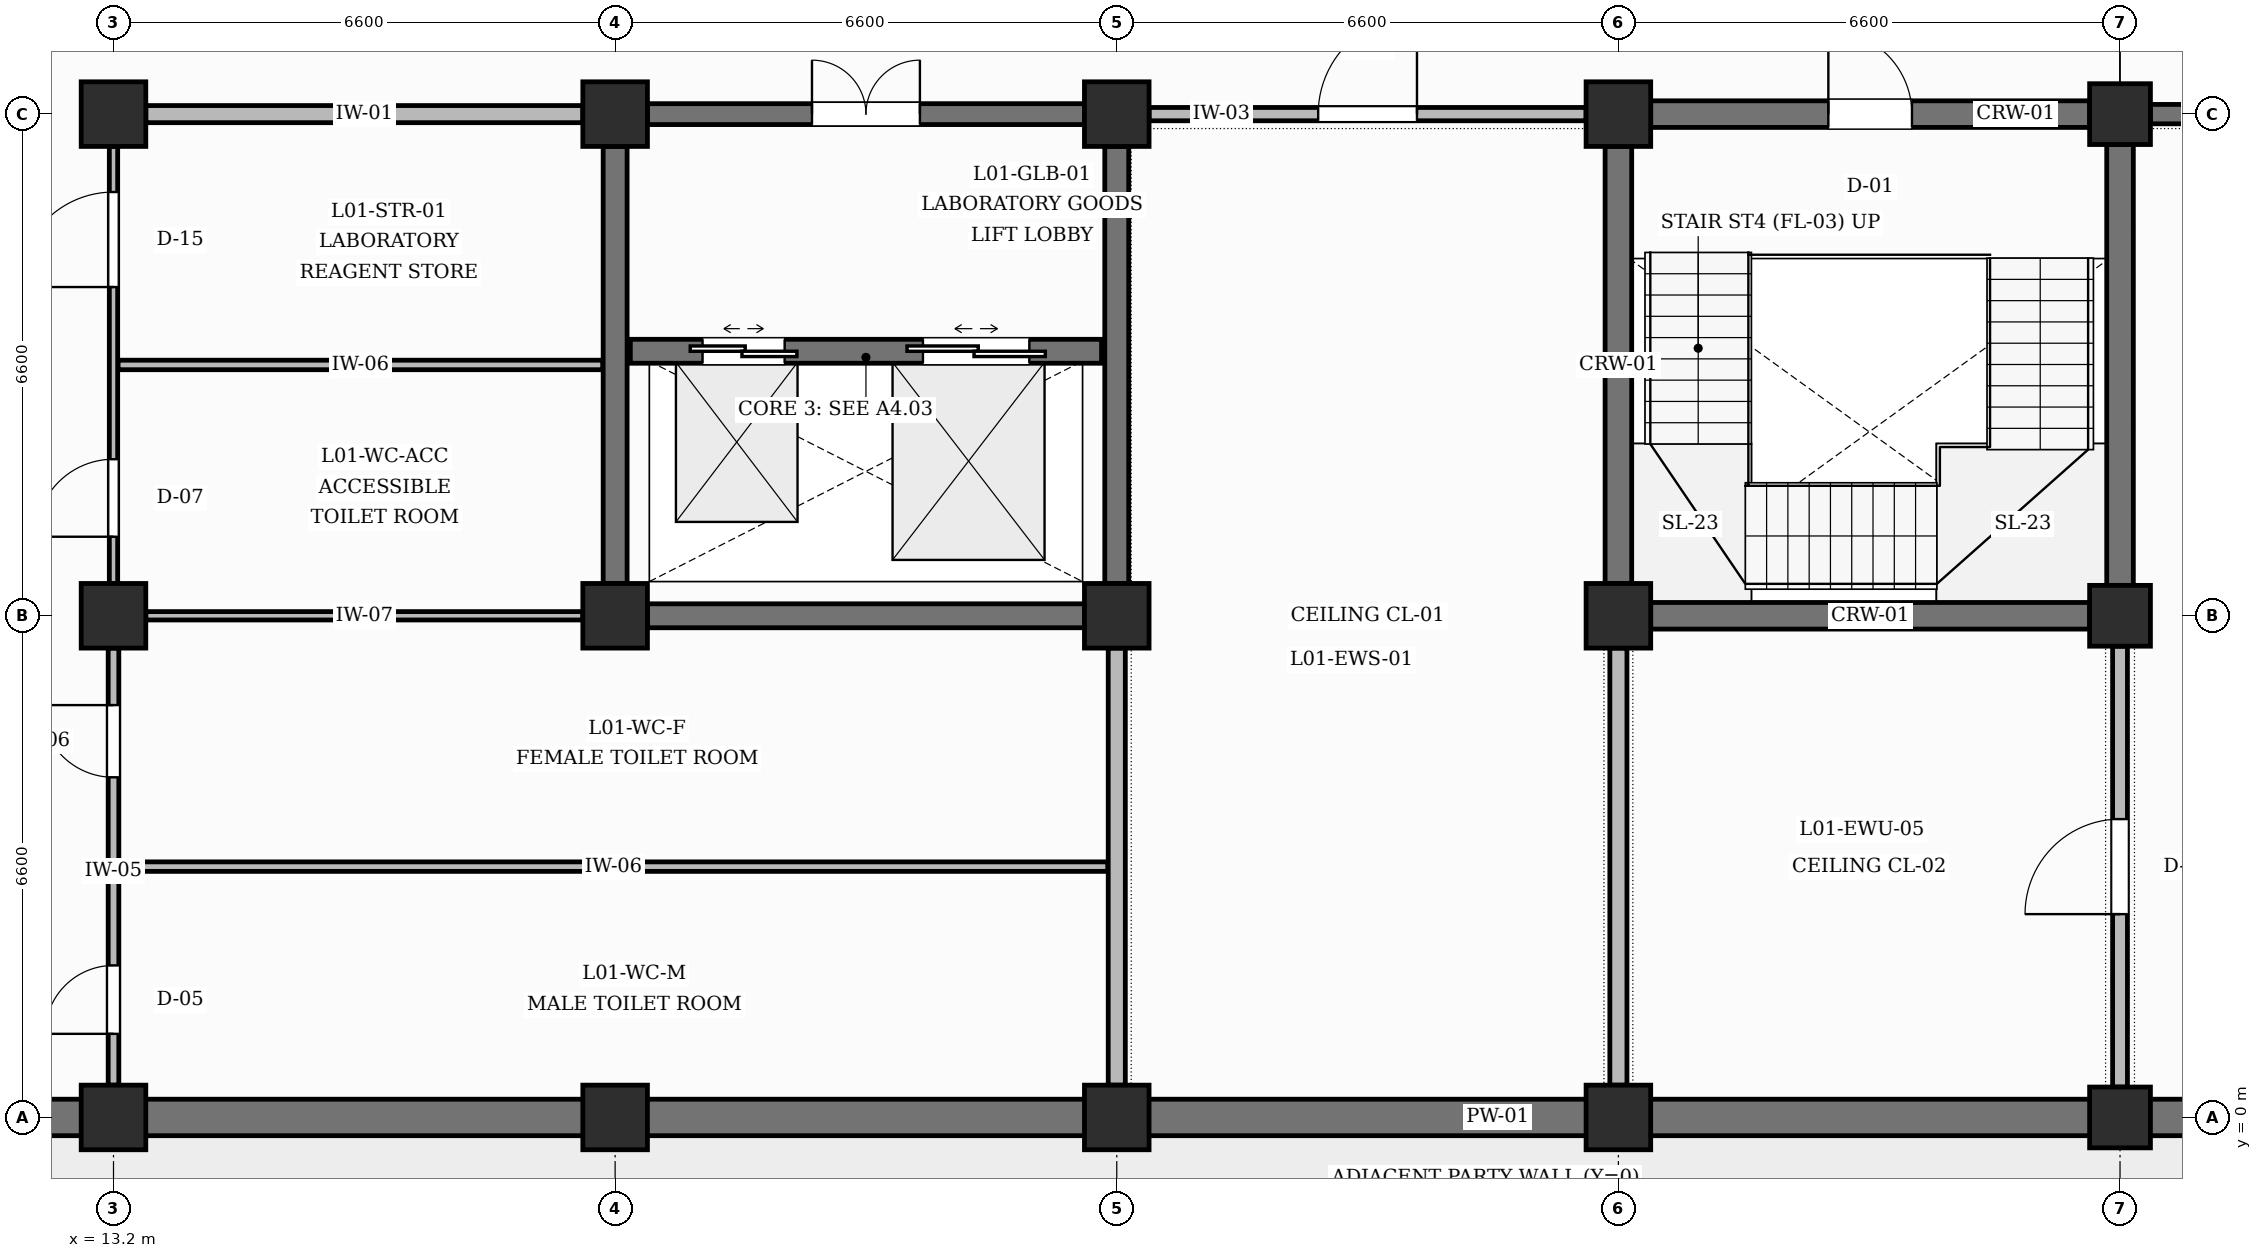
"""IFC4 building model, lengths in metres.
Left out: names, types, materials, properties, quantities, classifications, styles, units other than length and angle.
Written with IfcOpenShell. Run it as: python <this file> out.ifc"""

import sys

from ifc_helpers import new_model, si_unit, direction, frame, frame_2d, origin, origin_2d, place, context, subcontext, project, spatial, rectangle, extrude, element, fill, save


model = new_model("IFC4")
c1 = context("Model", 3, precision=1e-05, world=origin(), true_north=direction((0.0, 1.0)))
c2 = subcontext(c1, "Body", "Model", "MODEL_VIEW")
j1 = project(units=[si_unit("LENGTHUNIT", "METRE"), si_unit("PLANEANGLEUNIT", "RADIAN")], contexts=[c1])
p1 = place(None, origin())
s1 = spatial("IfcSite", under=j1, at=p1, CompositionType="ELEMENT")
p2 = place(p1, origin())
s2 = spatial("IfcBuilding", under=s1, at=p2, CompositionType="ELEMENT")
p3 = place(p2, frame((0.0, 0.0, 5.4)))
s3 = spatial("IfcBuildingStorey", under=s2, at=p3, CompositionType="ELEMENT", Elevation=5.4)
for number, where, z_axis, x_axis in (
    (1, (13.2, 0.0, 0.0), (0.0, 0.0, 1.0), (1.0, 0.0, 0.0)),
    (2, (13.2, 6.6, 0.0), (0.0, 0.0, 1.0), (1.0, 0.0, 0.0)),
    (3, (13.2, 13.2, 0.0), (0.0, 0.0, 1.0), (1.0, 0.0, 0.0)),
    (4, (19.8, 0.0, 0.0), (0.0, 0.0, 1.0), (1.0, 0.0, 0.0)),
    (5, (19.8, 6.6, 0.0), (0.0, 0.0, 1.0), (1.0, 0.0, 0.0)),
    (6, (19.8, 13.2, 0.0), (0.0, 0.0, 1.0), (1.0, 0.0, 0.0)),
    (7, (26.4, 0.0, 0.0), (0.0, 0.0, 1.0), (1.0, 0.0, 0.0)),
    (8, (26.4, 6.6, 0.0), (0.0, 0.0, 1.0), (1.0, 0.0, 0.0)),
    (9, (26.4, 13.2, 0.0), (0.0, 0.0, 1.0), (1.0, 0.0, 0.0)),
    (10, (33.0, 0.0, 0.0), (0.0, 0.0, 1.0), (1.0, 0.0, 0.0)),
    (11, (33.0, 6.6, 0.0), (0.0, 0.0, 1.0), (1.0, 0.0, 0.0)),
    (12, (33.0, 13.2, 0.0), (0.0, 0.0, 1.0), (1.0, 0.0, 0.0)),
):
    element("IfcColumn", number, at=place(p3, frame(where, z_axis=z_axis, x_axis=x_axis)), inside=s3, PredefinedType="COLUMN", context=c2, shape_type="SweptSolid", body=[
        extrude(rectangle(XDim=0.85, YDim=0.85, at=origin_2d()), origin(), (0.0, 0.0, 1.0), 4.8),
    ])
for number, where, z_axis, x_axis in (
    (13, (39.6, 0.0, 0.0), (0.0, 0.0, 1.0), (1.0, 0.0, 0.0)),
    (14, (39.6, 6.6, 0.0), (0.0, 0.0, 1.0), (1.0, 0.0, 0.0)),
    (15, (39.6, 13.2, 0.0), (0.0, 0.0, 1.0), (1.0, 0.0, 0.0)),
):
    element("IfcColumn", number, at=place(p3, frame(where, z_axis=z_axis, x_axis=x_axis)), inside=s3, PredefinedType="COLUMN", context=c2, shape_type="SweptSolid", body=[
        extrude(rectangle(XDim=0.8, YDim=0.8, at=origin_2d()), origin(), (0.0, 0.0, 1.0), 4.8),
    ])
for number, where, z_axis, x_axis in (
    (16, (7.025, 0.0, 0.0), (0.0, 0.0, 1.0), (1.0, 0.0, 0.0)),
    (17, (13.625, 0.0, 0.0), (0.0, 0.0, 1.0), (1.0, 0.0, 0.0)),
    (18, (20.225, 0.0, 0.0), (0.0, 0.0, 1.0), (1.0, 0.0, 0.0)),
    (19, (26.825, 0.0, 0.0), (0.0, 0.0, 1.0), (1.0, 0.0, 0.0)),
):
    element("IfcWall", number, at=place(p3, frame(where, z_axis=z_axis, x_axis=x_axis)), inside=s3, PredefinedType="SOLIDWALL", context=c2, shape_type="SweptSolid", body=[
        extrude(rectangle(XDim=5.75, YDim=0.48, at=frame_2d((2.875, 0.0))), origin(), (0.0, 0.0, 1.0), 3.85),
    ])
p4 = place(p3, frame((33.425, 0.0, 0.0), z_axis=(0.0, 0.0, 1.0), x_axis=(1.0, 0.0, 0.0)))
e20 = element("IfcWall", 20, at=p4, inside=s3, PredefinedType="SOLIDWALL", context=c2, shape_type="SweptSolid", body=[
    extrude(rectangle(XDim=5.775, YDim=0.48, at=frame_2d((2.887, 0.0))), origin(), (0.0, 0.0, 1.0), 3.85),
])
p5 = place(p3, frame((40.0, 0.0, 0.0), z_axis=(0.0, 0.0, 1.0), x_axis=(1.0, 0.0, 0.0)))
e21 = element("IfcWall", 21, at=p5, inside=s3, PredefinedType="SOLIDWALL", context=c2, shape_type="SweptSolid", body=[
    extrude(rectangle(XDim=5.8, YDim=0.48, at=frame_2d((2.9, 0.0))), origin(), (0.0, 0.0, 1.0), 3.85),
])
p6 = place(p3, frame((33.425, 6.6, 0.0), z_axis=(0.0, 0.0, 1.0), x_axis=(1.0, 0.0, 0.0)))
e22 = element("IfcWall", 22, at=p6, inside=s3, PredefinedType="SHEAR", context=c2, shape_type="SweptSolid", body=[
    extrude(rectangle(XDim=5.775, YDim=0.35, at=frame_2d((2.887, 0.0))), origin(), (0.0, 0.0, 1.0), 3.6),
])
p7 = place(p3, frame((33.425, 13.2, 0.0), z_axis=(0.0, 0.0, 1.0), x_axis=(1.0, 0.0, 0.0)))
e23 = element("IfcWall", 23, at=p7, inside=s3, PredefinedType="SHEAR", context=c2, shape_type="SweptSolid", body=[
    extrude(rectangle(XDim=5.775, YDim=0.35, at=frame_2d((2.887, 0.0))), origin(), (0.0, 0.0, 1.0), 3.7),
])
p8 = place(p7, frame((2.337, 0.0, 0.0)))
e24 = element("IfcOpeningElement", 24, at=p8, cuts=e23, PredefinedType="OPENING", context=c2, shape_type="SweptSolid", body=[
    extrude(rectangle(XDim=1.1, YDim=2.15, at=frame_2d((0.55, 1.075))), frame((0.0, 0.185, 0.0), z_axis=(0.0, -1.0, 0.0), x_axis=(1.0, 0.0, 0.0)), (0.0, 0.0, 1.0), 0.37),
])
p9 = place(p3, frame((33.0, 7.025, 0.0), z_axis=(0.0, 0.0, 1.0), x_axis=(0.0, 1.0, 0.0)))
e25 = element("IfcWall", 25, at=p9, inside=s3, PredefinedType="SHEAR", context=c2, shape_type="SweptSolid", body=[
    extrude(rectangle(XDim=5.75, YDim=0.35, at=frame_2d((2.875, 0.0))), origin(), (0.0, 0.0, 1.0), 3.7),
])
p10 = place(p3, frame((39.6, 7.0, 0.0), z_axis=(0.0, 0.0, 1.0), x_axis=(0.0, 1.0, 0.0)))
e26 = element("IfcWall", 26, at=p10, inside=s3, PredefinedType="SHEAR", context=c2, shape_type="SweptSolid", body=[
    extrude(rectangle(XDim=5.8, YDim=0.35, at=frame_2d((2.9, 0.0))), origin(), (0.0, 0.0, 1.0), 3.7),
])
p11 = place(p3, frame((20.225, 6.6, 0.0), z_axis=(0.0, 0.0, 1.0), x_axis=(1.0, 0.0, 0.0)))
e27 = element("IfcWall", 27, at=p11, inside=s3, PredefinedType="SHEAR", context=c2, shape_type="SweptSolid", body=[
    extrude(rectangle(XDim=5.75, YDim=0.315, at=frame_2d((2.875, 0.0))), origin(), (0.0, 0.0, 1.0), 3.6),
])
for number, where, z_axis, x_axis in (
    (28, (19.8, 7.025, 0.0), (0.0, 0.0, 1.0), (0.0, 1.0, 0.0)),
    (29, (26.4, 7.025, 0.0), (0.0, 0.0, 1.0), (0.0, 1.0, 0.0)),
):
    element("IfcWall", number, at=place(p3, frame(where, z_axis=z_axis, x_axis=x_axis)), inside=s3, PredefinedType="SHEAR", context=c2, shape_type="SweptSolid", body=[
        extrude(rectangle(XDim=5.75, YDim=0.315, at=frame_2d((2.875, 0.0))), origin(), (0.0, 0.0, 1.0), 3.7),
    ])
p12 = place(p3, frame((20.225, 13.2, 0.0), z_axis=(0.0, 0.0, 1.0), x_axis=(1.0, 0.0, 0.0)))
e30 = element("IfcWall", 30, at=p12, inside=s3, PredefinedType="SHEAR", context=c2, shape_type="SweptSolid", body=[
    extrude(rectangle(XDim=5.75, YDim=0.275, at=frame_2d((2.875, 0.0))), origin(), (0.0, 0.0, 1.0), 3.7),
])
p13 = place(p12, frame((2.165, 0.0, 0.0)))
e31 = element("IfcOpeningElement", 31, at=p13, cuts=e30, PredefinedType="OPENING", context=c2, shape_type="SweptSolid", body=[
    extrude(rectangle(XDim=1.42, YDim=2.2, at=frame_2d((0.71, 1.1))), frame((0.0, 0.147, 0.0), z_axis=(0.0, -1.0, 0.0), x_axis=(1.0, 0.0, 0.0)), (0.0, 0.0, 1.0), 0.295),
])
p14 = place(p3, frame((20.0, 10.08, 0.0), z_axis=(0.0, 0.0, 1.0), x_axis=(1.0, 0.0, 0.0)))
e32 = element("IfcWall", 32, at=p14, inside=s3, PredefinedType="SHEAR", context=c2, shape_type="SweptSolid", body=[
    extrude(rectangle(XDim=6.2, YDim=0.315, at=frame_2d((3.1, 0.0))), origin(), (0.0, 0.0, 1.0), 4.45),
])
p15 = place(p14, frame((0.95, 0.0, 0.0)))
e33 = element("IfcOpeningElement", 33, at=p15, cuts=e32, PredefinedType="OPENING", context=c2, shape_type="SweptSolid", body=[
    extrude(rectangle(XDim=1.08, YDim=2.15, at=frame_2d((0.54, 1.075))), frame((0.0, 0.167, 0.0), z_axis=(0.0, -1.0, 0.0), x_axis=(1.0, 0.0, 0.0)), (0.0, 0.0, 1.0), 0.335),
])
p16 = place(p14, frame((3.85, 0.0, 0.0)))
e34 = element("IfcOpeningElement", 34, at=p16, cuts=e32, PredefinedType="OPENING", context=c2, shape_type="SweptSolid", body=[
    extrude(rectangle(XDim=1.4, YDim=2.35, at=frame_2d((0.7, 1.175))), frame((0.0, 0.167, 0.0), z_axis=(0.0, -1.0, 0.0), x_axis=(1.0, 0.0, 0.0)), (0.0, 0.0, 1.0), 0.335),
])
p17 = place(p3, frame((13.2, 0.425, 0.0), z_axis=(0.0, 0.0, 1.0), x_axis=(0.0, 1.0, 0.0)))
e35 = element("IfcWall", 35, at=p17, inside=s3, PredefinedType="PARTITIONING", context=c2, shape_type="SweptSolid", body=[
    extrude(rectangle(XDim=5.75, YDim=0.14, at=frame_2d((2.875, 0.0))), origin(), (0.0, 0.0, 1.0), 3.7),
])
p18 = place(p17, frame((0.675, 0.0, 0.0)))
e36 = element("IfcOpeningElement", 36, at=p18, cuts=e35, PredefinedType="OPENING", context=c2, shape_type="SweptSolid", body=[
    extrude(rectangle(XDim=0.9, YDim=2.1, at=frame_2d((0.45, 1.05))), frame((0.0, 0.08, 0.0), z_axis=(0.0, -1.0, 0.0), x_axis=(1.0, 0.0, 0.0)), (0.0, 0.0, 1.0), 0.16),
])
p19 = place(p17, frame((4.05, 0.0, 0.0)))
e37 = element("IfcOpeningElement", 37, at=p19, cuts=e35, PredefinedType="OPENING", context=c2, shape_type="SweptSolid", body=[
    extrude(rectangle(XDim=0.95, YDim=2.1, at=frame_2d((0.475, 1.05))), frame((0.0, 0.08, 0.0), z_axis=(0.0, -1.0, 0.0), x_axis=(1.0, 0.0, 0.0)), (0.0, 0.0, 1.0), 0.16),
])
p20 = place(p3, frame((26.4, 0.425, 0.0), z_axis=(0.0, 0.0, 1.0), x_axis=(0.0, 1.0, 0.0)))
e38 = element("IfcWall", 38, at=p20, inside=s3, PredefinedType="PARTITIONING", context=c2, shape_type="SweptSolid", body=[
    extrude(rectangle(XDim=5.75, YDim=0.225, at=frame_2d((2.875, 0.0))), origin(), (0.0, 0.0, 1.0), 3.7),
])
p21 = place(p3, frame((13.625, 6.6, 0.0), z_axis=(0.0, 0.0, 1.0), x_axis=(1.0, 0.0, 0.0)))
e39 = element("IfcWall", 39, at=p21, inside=s3, PredefinedType="PARTITIONING", context=c2, shape_type="SweptSolid", body=[
    extrude(rectangle(XDim=5.75, YDim=0.11, at=frame_2d((2.875, 0.0))), origin(), (0.0, 0.0, 1.0), 3.7),
])
p22 = place(p3, frame((13.2, 7.025, 0.0), z_axis=(0.0, 0.0, 1.0), x_axis=(0.0, 1.0, 0.0)))
e40 = element("IfcWall", 40, at=p22, inside=s3, PredefinedType="PARTITIONING", context=c2, shape_type="SweptSolid", body=[
    extrude(rectangle(XDim=5.75, YDim=0.11, at=frame_2d((2.875, 0.0))), origin(), (0.0, 0.0, 1.0), 3.7),
])
p23 = place(p22, frame((0.615, 0.0, 0.0)))
e41 = element("IfcOpeningElement", 41, at=p23, cuts=e40, PredefinedType="OPENING", context=c2, shape_type="SweptSolid", body=[
    extrude(rectangle(XDim=1.02, YDim=2.15, at=frame_2d((0.51, 1.075))), frame((0.0, 0.065, 0.0), z_axis=(0.0, -1.0, 0.0), x_axis=(1.0, 0.0, 0.0)), (0.0, 0.0, 1.0), 0.13),
])
p24 = place(p22, frame((3.9, 0.0, 0.0)))
e42 = element("IfcOpeningElement", 42, at=p24, cuts=e40, PredefinedType="OPENING", context=c2, shape_type="SweptSolid", body=[
    extrude(rectangle(XDim=1.25, YDim=2.25, at=frame_2d((0.625, 1.125))), frame((0.0, 0.065, 0.0), z_axis=(0.0, -1.0, 0.0), x_axis=(1.0, 0.0, 0.0)), (0.0, 0.0, 1.0), 0.13),
])
p25 = place(p3, frame((13.625, 13.2, 0.0), z_axis=(0.0, 0.0, 1.0), x_axis=(1.0, 0.0, 0.0)))
e43 = element("IfcWall", 43, at=p25, inside=s3, PredefinedType="PARTITIONING", context=c2, shape_type="SweptSolid", body=[
    extrude(rectangle(XDim=5.75, YDim=0.225, at=frame_2d((2.875, 0.0))), origin(), (0.0, 0.0, 1.0), 3.6),
])
p26 = place(p3, frame((33.0, 0.425, 0.0), z_axis=(0.0, 0.0, 1.0), x_axis=(0.0, 1.0, 0.0)))
e44 = element("IfcWall", 44, at=p26, inside=s3, PredefinedType="PARTITIONING", context=c2, shape_type="SweptSolid", body=[
    extrude(rectangle(XDim=5.75, YDim=0.225, at=frame_2d((2.875, 0.0))), origin(), (0.0, 0.0, 1.0), 3.7),
])
p27 = place(p3, frame((26.825, 13.2, 0.0), z_axis=(0.0, 0.0, 1.0), x_axis=(1.0, 0.0, 0.0)))
e45 = element("IfcWall", 45, at=p27, inside=s3, PredefinedType="PARTITIONING", context=c2, shape_type="SweptSolid", body=[
    extrude(rectangle(XDim=5.75, YDim=0.175, at=frame_2d((2.875, 0.0))), origin(), (0.0, 0.0, 1.0), 3.6),
])
p28 = place(p27, frame((2.225, 0.0, 0.0)))
e46 = element("IfcOpeningElement", 46, at=p28, cuts=e45, PredefinedType="OPENING", context=c2, shape_type="SweptSolid", body=[
    extrude(rectangle(XDim=1.3, YDim=2.3, at=frame_2d((0.65, 1.15))), frame((0.0, 0.097, 0.0), z_axis=(0.0, -1.0, 0.0), x_axis=(1.0, 0.0, 0.0)), (0.0, 0.0, 1.0), 0.195),
])
p29 = place(p3, frame((39.6, 0.4, 0.0), z_axis=(0.0, 0.0, 1.0), x_axis=(0.0, 1.0, 0.0)))
e47 = element("IfcWall", 47, at=p29, inside=s3, PredefinedType="PARTITIONING", context=c2, shape_type="SweptSolid", body=[
    extrude(rectangle(XDim=5.8, YDim=0.195, at=frame_2d((2.9, 0.0))), origin(), (0.0, 0.0, 1.0), 3.7),
])
p30 = place(p29, frame((2.275, 0.0, 0.0)))
e48 = element("IfcOpeningElement", 48, at=p30, cuts=e47, PredefinedType="OPENING", context=c2, shape_type="SweptSolid", body=[
    extrude(rectangle(XDim=1.25, YDim=2.25, at=frame_2d((0.625, 1.125))), frame((0.0, 0.107, 0.0), z_axis=(0.0, -1.0, 0.0), x_axis=(1.0, 0.0, 0.0)), (0.0, 0.0, 1.0), 0.215),
])
p31 = place(p3, frame((40.0, 13.2, 0.0), z_axis=(0.0, 0.0, 1.0), x_axis=(1.0, 0.0, 0.0)))
e49 = element("IfcWall", 49, at=p31, inside=s3, PredefinedType="SHEAR", context=c2, shape_type="SweptSolid", body=[
    extrude(rectangle(XDim=5.8, YDim=0.255, at=frame_2d((2.9, 0.0))), origin(), (0.0, 0.0, 1.0), 3.6),
])
p32 = place(p31, frame((2.275, 0.0, 0.0)))
e50 = element("IfcOpeningElement", 50, at=p32, cuts=e49, PredefinedType="OPENING", context=c2, shape_type="SweptSolid", body=[
    extrude(rectangle(XDim=1.25, YDim=2.25, at=frame_2d((0.625, 1.125))), frame((0.0, 0.137, 0.0), z_axis=(0.0, -1.0, 0.0), x_axis=(1.0, 0.0, 0.0)), (0.0, 0.0, 1.0), 0.275),
])
p33 = place(p3, frame((13.275, 3.3, 0.0), z_axis=(0.0, 0.0, 1.0), x_axis=(1.0, 0.0, 0.0)))
e51 = element("IfcWall", 51, at=p33, inside=s3, PredefinedType="PARTITIONING", context=c2, shape_type="SweptSolid", body=[
    extrude(rectangle(XDim=13.008, YDim=0.125, at=frame_2d((6.504, 0.0))), origin(), (0.0, 0.0, 1.0), 4.45),
])
p34 = place(p3, frame((13.26, 9.9, 0.0), z_axis=(0.0, 0.0, 1.0), x_axis=(1.0, 0.0, 0.0)))
e52 = element("IfcWall", 52, at=p34, inside=s3, PredefinedType="PARTITIONING", context=c2, shape_type="SweptSolid", body=[
    extrude(rectangle(XDim=6.377, YDim=0.125, at=frame_2d((3.189, 0.0))), origin(), (0.0, 0.0, 1.0), 4.45),
])
p35 = place(p8, origin())
e53 = element("IfcDoor", 53, at=p35, inside=s3, OperationType="SINGLE_SWING_LEFT", PredefinedType="DOOR", context=c2, shape_type="SweptSolid", body=[
    extrude(rectangle(XDim=1.1, YDim=2.15, at=frame_2d((0.55, 1.075))), frame((0.0, 0.025, 0.0), z_axis=(0.0, -1.0, 0.0), x_axis=(1.0, 0.0, 0.0)), (0.0, 0.0, 1.0), 0.05),
])
fill(e24, e53)
p36 = place(p15, origin())
e54 = element("IfcDoor", 54, at=p36, inside=s3, OperationType="DOUBLE_DOOR_SLIDING", PredefinedType="USERDEFINED", context=c2, shape_type="SweptSolid", body=[
    extrude(rectangle(XDim=1.08, YDim=2.15, at=frame_2d((0.54, 1.075))), frame((0.0, 0.025, 0.0), z_axis=(0.0, -1.0, 0.0), x_axis=(1.0, 0.0, 0.0)), (0.0, 0.0, 1.0), 0.05),
])
fill(e33, e54)
p37 = place(p16, origin())
e55 = element("IfcDoor", 55, at=p37, inside=s3, OperationType="DOUBLE_DOOR_SLIDING", PredefinedType="USERDEFINED", context=c2, shape_type="SweptSolid", body=[
    extrude(rectangle(XDim=1.4, YDim=2.35, at=frame_2d((0.7, 1.175))), frame((0.0, 0.025, 0.0), z_axis=(0.0, -1.0, 0.0), x_axis=(1.0, 0.0, 0.0)), (0.0, 0.0, 1.0), 0.05),
])
fill(e34, e55)
p38 = place(p13, origin())
e56 = element("IfcDoor", 56, at=p38, inside=s3, OperationType="DOUBLE_DOOR_SINGLE_SWING", PredefinedType="DOOR", context=c2, shape_type="SweptSolid", body=[
    extrude(rectangle(XDim=1.42, YDim=2.2, at=frame_2d((0.71, 1.1))), frame((0.0, 0.025, 0.0), z_axis=(0.0, -1.0, 0.0), x_axis=(1.0, 0.0, 0.0)), (0.0, 0.0, 1.0), 0.05),
])
fill(e31, e56)
p39 = place(p18, origin())
e57 = element("IfcDoor", 57, at=p39, inside=s3, OperationType="SINGLE_SWING_LEFT", PredefinedType="DOOR", context=c2, shape_type="SweptSolid", body=[
    extrude(rectangle(XDim=0.9, YDim=2.1, at=frame_2d((0.45, 1.05))), frame((0.0, 0.025, 0.0), z_axis=(0.0, -1.0, 0.0), x_axis=(1.0, 0.0, 0.0)), (0.0, 0.0, 1.0), 0.05),
])
fill(e36, e57)
p40 = place(p19, origin())
e58 = element("IfcDoor", 58, at=p40, inside=s3, OperationType="SINGLE_SWING_RIGHT", PredefinedType="DOOR", context=c2, shape_type="SweptSolid", body=[
    extrude(rectangle(XDim=0.95, YDim=2.1, at=frame_2d((0.475, 1.05))), frame((0.0, 0.025, 0.0), z_axis=(0.0, -1.0, 0.0), x_axis=(1.0, 0.0, 0.0)), (0.0, 0.0, 1.0), 0.05),
])
fill(e37, e58)
p41 = place(p23, origin())
e59 = element("IfcDoor", 59, at=p41, inside=s3, OperationType="SINGLE_SWING_LEFT", PredefinedType="DOOR", context=c2, shape_type="SweptSolid", body=[
    extrude(rectangle(XDim=1.02, YDim=2.15, at=frame_2d((0.51, 1.075))), frame((0.0, 0.025, 0.0), z_axis=(0.0, -1.0, 0.0), x_axis=(1.0, 0.0, 0.0)), (0.0, 0.0, 1.0), 0.05),
])
fill(e41, e59)
p42 = place(p24, origin())
e60 = element("IfcDoor", 60, at=p42, inside=s3, OperationType="SINGLE_SWING_LEFT", PredefinedType="DOOR", context=c2, shape_type="SweptSolid", body=[
    extrude(rectangle(XDim=1.25, YDim=2.25, at=frame_2d((0.625, 1.125))), frame((0.0, 0.025, 0.0), z_axis=(0.0, -1.0, 0.0), x_axis=(1.0, 0.0, 0.0)), (0.0, 0.0, 1.0), 0.05),
])
fill(e42, e60)
p43 = place(p28, origin())
e61 = element("IfcDoor", 61, at=p43, inside=s3, OperationType="SINGLE_SWING_RIGHT", PredefinedType="DOOR", context=c2, shape_type="SweptSolid", body=[
    extrude(rectangle(XDim=1.3, YDim=2.3, at=frame_2d((0.65, 1.15))), frame((0.0, 0.025, 0.0), z_axis=(0.0, -1.0, 0.0), x_axis=(1.0, 0.0, 0.0)), (0.0, 0.0, 1.0), 0.05),
])
fill(e46, e61)
p44 = place(p30, origin())
e62 = element("IfcDoor", 62, at=p44, inside=s3, OperationType="SINGLE_SWING_LEFT", PredefinedType="DOOR", context=c2, shape_type="SweptSolid", body=[
    extrude(rectangle(XDim=1.25, YDim=2.25, at=frame_2d((0.625, 1.125))), frame((0.0, 0.025, 0.0), z_axis=(0.0, -1.0, 0.0), x_axis=(1.0, 0.0, 0.0)), (0.0, 0.0, 1.0), 0.05),
])
fill(e48, e62)
save(model, sys.argv[1])
